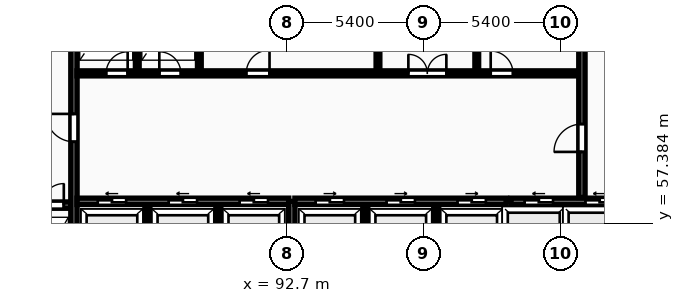
"""IFC4 building model, lengths in metres.
Left out: names, types, materials, properties, quantities, classifications, styles, units other than length and angle.
Written with IfcOpenShell. Run it as: python <this file> out.ifc"""

import sys

from ifc_helpers import new_model, si_unit, direction, frame, frame_2d, origin, place, context, subcontext, project, spatial, rectangle, extrude, element, fill, save


model = new_model("IFC4")
c1 = context("Model", 3, precision=1e-05, world=origin(), true_north=direction((0.0, 1.0)))
c2 = subcontext(c1, "Body", "Model", "MODEL_VIEW")
j1 = project(units=[si_unit("LENGTHUNIT", "METRE"), si_unit("PLANEANGLEUNIT", "RADIAN")], contexts=[c1])
p1 = place(None, origin())
s1 = spatial("IfcSite", under=j1, at=p1, CompositionType="ELEMENT")
p2 = place(p1, origin())
s2 = spatial("IfcBuilding", under=s1, at=p2, CompositionType="ELEMENT")
p3 = place(p2, frame((0.0, 0.0, 93.8)))
s3 = spatial("IfcBuildingStorey", under=s2, at=p3, CompositionType="ELEMENT", Elevation=93.8)
p4 = place(p3, frame((79.79, 58.1, 0.0), z_axis=(0.0, 0.0, 1.0), x_axis=(1.0, 0.0, 0.0)))
e1 = element("IfcWall", 1, at=p4, inside=s3, PredefinedType="SHEAR", context=c2, shape_type="SweptSolid", body=[
    extrude(rectangle(XDim=4.39, YDim=0.25, at=frame_2d((2.195, 0.0))), origin(), (0.0, 0.0, 1.0), 3.25),
])
p5 = place(p4, frame((1.05, 0.0, 0.0)))
e2 = element("IfcOpeningElement", 2, at=p5, cuts=e1, PredefinedType="OPENING", context=c2, shape_type="SweptSolid", body=[
    extrude(rectangle(XDim=1.12, YDim=2.12, at=frame_2d((0.56, 1.06))), frame((0.0, 0.135, 0.0), z_axis=(0.0, -1.0, 0.0), x_axis=(1.0, 0.0, 0.0)), (0.0, 0.0, 1.0), 0.27),
])
p6 = place(p4, frame((3.26, 0.0, 0.0)))
e3 = element("IfcOpeningElement", 3, at=p6, cuts=e1, PredefinedType="OPENING", context=c2, shape_type="SweptSolid", body=[
    extrude(rectangle(XDim=0.85, YDim=2.05, at=frame_2d((0.425, 1.025))), frame((0.0, 0.135, 0.0), z_axis=(0.0, -1.0, 0.0), x_axis=(1.0, 0.0, 0.0)), (0.0, 0.0, 1.0), 0.27),
])
p7 = place(p3, frame((84.3, 55.4, 0.0), z_axis=(0.0, 0.0, 1.0), x_axis=(0.0, 1.0, 0.0)))
e4 = element("IfcWall", 4, at=p7, inside=s3, PredefinedType="SHEAR", context=c2, shape_type="SweptSolid", body=[
    extrude(rectangle(XDim=11.6, YDim=0.25, at=frame_2d((5.8, 0.0))), origin(), (0.0, 0.0, 1.0), 3.25),
])
p8 = place(p7, frame((5.2, 0.0, 0.0)))
e5 = element("IfcOpeningElement", 5, at=p8, cuts=e4, PredefinedType="OPENING", context=c2, shape_type="SweptSolid", body=[
    extrude(rectangle(XDim=1.1, YDim=2.1, at=frame_2d((0.55, 1.05))), frame((0.0, 0.135, 0.0), z_axis=(0.0, -1.0, 0.0), x_axis=(1.0, 0.0, 0.0)), (0.0, 0.0, 1.0), 0.27),
])
for number, where, z_axis, x_axis in (
    (6, (87.2, 55.4, 0.0), (0.0, 0.0, 1.0), (0.0, 1.0, 0.0)),
    (7, (90.0, 55.4, 0.0), (0.0, 0.0, 1.0), (0.0, 1.0, 0.0)),
):
    element("IfcWall", number, at=place(p3, frame(where, z_axis=z_axis, x_axis=x_axis)), inside=s3, PredefinedType="PARTITIONING", context=c2, shape_type="SweptSolid", body=[
        extrude(rectangle(XDim=2.72, YDim=0.2, at=frame_2d((1.36, 0.0))), origin(), (0.0, 0.0, 1.0), 2.97),
    ])
p9 = place(p3, frame((84.42, 58.25, 0.0), z_axis=(0.0, 0.0, 1.0), x_axis=(1.0, 0.0, 0.0)))
e8 = element("IfcWall", 8, at=p9, inside=s3, PredefinedType="SHEAR", context=c2, shape_type="SweptSolid", body=[
    extrude(rectangle(XDim=8.36, YDim=0.25, at=frame_2d((4.18, 0.0))), origin(), (0.0, 0.0, 1.0), 3.25),
])
p10 = place(p9, frame((0.82, 0.0, 0.0)))
e9 = element("IfcOpeningElement", 9, at=p10, cuts=e8, PredefinedType="OPENING", context=c2, shape_type="SweptSolid", body=[
    extrude(rectangle(XDim=1.12, YDim=2.12, at=frame_2d((0.56, 1.06))), frame((0.0, 0.135, 0.0), z_axis=(0.0, -1.0, 0.0), x_axis=(1.0, 0.0, 0.0)), (0.0, 0.0, 1.0), 0.27),
])
p11 = place(p9, frame((3.62, 0.0, 0.0)))
e10 = element("IfcOpeningElement", 10, at=p11, cuts=e8, PredefinedType="OPENING", context=c2, shape_type="SweptSolid", body=[
    extrude(rectangle(XDim=1.12, YDim=2.12, at=frame_2d((0.56, 1.06))), frame((0.0, 0.135, 0.0), z_axis=(0.0, -1.0, 0.0), x_axis=(1.0, 0.0, 0.0)), (0.0, 0.0, 1.0), 0.27),
])
p12 = place(p9, frame((6.42, 0.0, 0.0)))
e11 = element("IfcOpeningElement", 11, at=p12, cuts=e8, PredefinedType="OPENING", context=c2, shape_type="SweptSolid", body=[
    extrude(rectangle(XDim=1.12, YDim=2.12, at=frame_2d((0.56, 1.06))), frame((0.0, 0.135, 0.0), z_axis=(0.0, -1.0, 0.0), x_axis=(1.0, 0.0, 0.0)), (0.0, 0.0, 1.0), 0.27),
])
p13 = place(p3, frame((92.9, 55.4, 0.0), z_axis=(0.0, 0.0, 1.0), x_axis=(0.0, 1.0, 0.0)))
e12 = element("IfcWall", 12, at=p13, inside=s3, PredefinedType="SHEAR", context=c2, shape_type="SweptSolid", body=[
    extrude(rectangle(XDim=2.85, YDim=0.25, at=frame_2d((1.425, 0.0))), origin(), (0.0, 0.0, 1.0), 3.25),
])
for number, where, z_axis, x_axis in (
    (13, (95.8, 55.4, 0.0), (0.0, 0.0, 1.0), (0.0, 1.0, 0.0)),
    (14, (98.6, 55.4, 0.0), (0.0, 0.0, 1.0), (0.0, 1.0, 0.0)),
):
    element("IfcWall", number, at=place(p3, frame(where, z_axis=z_axis, x_axis=x_axis)), inside=s3, PredefinedType="PARTITIONING", context=c2, shape_type="SweptSolid", body=[
        extrude(rectangle(XDim=2.72, YDim=0.2, at=frame_2d((1.36, 0.0))), origin(), (0.0, 0.0, 1.0), 2.97),
    ])
p14 = place(p3, frame((93.02, 58.25, 0.0), z_axis=(0.0, 0.0, 1.0), x_axis=(1.0, 0.0, 0.0)))
e15 = element("IfcWall", 15, at=p14, inside=s3, PredefinedType="SHEAR", context=c2, shape_type="SweptSolid", body=[
    extrude(rectangle(XDim=8.36, YDim=0.25, at=frame_2d((4.18, 0.0))), origin(), (0.0, 0.0, 1.0), 3.25),
])
p15 = place(p14, frame((0.82, 0.0, 0.0)))
e16 = element("IfcOpeningElement", 16, at=p15, cuts=e15, PredefinedType="OPENING", context=c2, shape_type="SweptSolid", body=[
    extrude(rectangle(XDim=1.12, YDim=2.12, at=frame_2d((0.56, 1.06))), frame((0.0, 0.135, 0.0), z_axis=(0.0, -1.0, 0.0), x_axis=(1.0, 0.0, 0.0)), (0.0, 0.0, 1.0), 0.27),
])
p16 = place(p14, frame((3.62, 0.0, 0.0)))
e17 = element("IfcOpeningElement", 17, at=p16, cuts=e15, PredefinedType="OPENING", context=c2, shape_type="SweptSolid", body=[
    extrude(rectangle(XDim=1.12, YDim=2.12, at=frame_2d((0.56, 1.06))), frame((0.0, 0.135, 0.0), z_axis=(0.0, -1.0, 0.0), x_axis=(1.0, 0.0, 0.0)), (0.0, 0.0, 1.0), 0.27),
])
p17 = place(p14, frame((6.42, 0.0, 0.0)))
e18 = element("IfcOpeningElement", 18, at=p17, cuts=e15, PredefinedType="OPENING", context=c2, shape_type="SweptSolid", body=[
    extrude(rectangle(XDim=1.12, YDim=2.12, at=frame_2d((0.56, 1.06))), frame((0.0, 0.135, 0.0), z_axis=(0.0, -1.0, 0.0), x_axis=(1.0, 0.0, 0.0)), (0.0, 0.0, 1.0), 0.27),
])
p18 = place(p3, frame((101.48, 55.4, 0.0), z_axis=(0.0, 0.0, 1.0), x_axis=(0.0, 1.0, 0.0)))
e19 = element("IfcWall", 19, at=p18, inside=s3, PredefinedType="SHEAR", context=c2, shape_type="SweptSolid", body=[
    extrude(rectangle(XDim=2.85, YDim=0.25, at=frame_2d((1.425, 0.0))), origin(), (0.0, 0.0, 1.0), 3.25),
])
p19 = place(p3, frame((103.85, 55.4, 0.0), z_axis=(0.0, 0.0, 1.0), x_axis=(0.0, 1.0, 0.0)))
e20 = element("IfcWall", 20, at=p19, inside=s3, PredefinedType="PARTITIONING", context=c2, shape_type="SweptSolid", body=[
    extrude(rectangle(XDim=2.72, YDim=0.2, at=frame_2d((1.36, 0.0))), origin(), (0.0, 0.0, 1.0), 2.97),
])
p20 = place(p3, frame((101.55, 58.25, 0.0), z_axis=(0.0, 0.0, 1.0), x_axis=(1.0, 0.0, 0.0)))
e21 = element("IfcWall", 21, at=p20, inside=s3, PredefinedType="SHEAR", context=c2, shape_type="SweptSolid", body=[
    extrude(rectangle(XDim=4.6, YDim=0.25, at=frame_2d((2.3, 0.0))), origin(), (0.0, 0.0, 1.0), 3.25),
])
p21 = place(p20, frame((0.54, 0.0, 0.0)))
e22 = element("IfcOpeningElement", 22, at=p21, cuts=e21, PredefinedType="OPENING", context=c2, shape_type="SweptSolid", body=[
    extrude(rectangle(XDim=1.12, YDim=2.12, at=frame_2d((0.56, 1.06))), frame((0.0, 0.135, 0.0), z_axis=(0.0, -1.0, 0.0), x_axis=(1.0, 0.0, 0.0)), (0.0, 0.0, 1.0), 0.27),
])
p22 = place(p20, frame((2.94, 0.0, 0.0)))
e23 = element("IfcOpeningElement", 23, at=p22, cuts=e21, PredefinedType="OPENING", context=c2, shape_type="SweptSolid", body=[
    extrude(rectangle(XDim=1.12, YDim=2.12, at=frame_2d((0.56, 1.06))), frame((0.0, 0.135, 0.0), z_axis=(0.0, -1.0, 0.0), x_axis=(1.0, 0.0, 0.0)), (0.0, 0.0, 1.0), 0.27),
])
for number, where, z_axis, x_axis in (
    (24, (86.8, 63.4, 0.0), (0.0, 0.0, 1.0), (0.0, 1.0, 0.0)),
    (25, (89.25, 63.4, 0.0), (0.0, 0.0, 1.0), (0.0, 1.0, 0.0)),
    (26, (96.3, 63.4, 0.0), (0.0, 0.0, 1.0), (0.0, 1.0, 0.0)),
    (27, (100.2, 63.4, 0.0), (0.0, 0.0, 1.0), (0.0, 1.0, 0.0)),
):
    element("IfcWall", number, at=place(p3, frame(where, z_axis=z_axis, x_axis=x_axis)), inside=s3, PredefinedType="PARTITIONING", context=c2, shape_type="SweptSolid", body=[
        extrude(rectangle(XDim=3.6, YDim=0.15, at=frame_2d((1.8, 0.0))), origin(), (0.0, 0.0, 1.0), 2.97),
    ])
p23 = place(p3, frame((84.42, 63.3, 0.0), z_axis=(0.0, 0.0, 1.0), x_axis=(1.0, 0.0, 0.0)))
e28 = element("IfcWall", 28, at=p23, inside=s3, PredefinedType="PARTITIONING", context=c2, shape_type="SweptSolid", body=[
    extrude(rectangle(XDim=19.83, YDim=0.2, at=frame_2d((9.915, 0.0))), origin(), (0.0, 0.0, 1.0), 2.97),
])
p24 = place(p23, frame((1.15, 0.0, 0.0)))
e29 = element("IfcOpeningElement", 29, at=p24, cuts=e28, PredefinedType="OPENING", context=c2, shape_type="SweptSolid", body=[
    extrude(rectangle(XDim=0.85, YDim=2.05, at=frame_2d((0.425, 1.025))), frame((0.0, 0.11, 0.0), z_axis=(0.0, -1.0, 0.0), x_axis=(1.0, 0.0, 0.0)), (0.0, 0.0, 1.0), 0.22),
])
p25 = place(p23, frame((3.25, 0.0, 0.0)))
e30 = element("IfcOpeningElement", 30, at=p25, cuts=e28, PredefinedType="OPENING", context=c2, shape_type="SweptSolid", body=[
    extrude(rectangle(XDim=0.85, YDim=2.05, at=frame_2d((0.425, 1.025))), frame((0.0, 0.11, 0.0), z_axis=(0.0, -1.0, 0.0), x_axis=(1.0, 0.0, 0.0)), (0.0, 0.0, 1.0), 0.22),
])
p26 = place(p23, frame((13.08, 0.0, 0.0)))
e31 = element("IfcOpeningElement", 31, at=p26, cuts=e28, PredefinedType="OPENING", context=c2, shape_type="SweptSolid", body=[
    extrude(rectangle(XDim=1.5, YDim=2.2, at=frame_2d((0.75, 1.1))), frame((0.0, 0.11, 0.0), z_axis=(0.0, -1.0, 0.0), x_axis=(1.0, 0.0, 0.0)), (0.0, 0.0, 1.0), 0.22),
])
p27 = place(p23, frame((6.68, 0.0, 0.0)))
e32 = element("IfcOpeningElement", 32, at=p27, cuts=e28, PredefinedType="OPENING", context=c2, shape_type="SweptSolid", body=[
    extrude(rectangle(XDim=0.92, YDim=2.08, at=frame_2d((0.46, 1.04))), frame((0.0, 0.11, 0.0), z_axis=(0.0, -1.0, 0.0), x_axis=(1.0, 0.0, 0.0)), (0.0, 0.0, 1.0), 0.22),
])
p28 = place(p23, frame((16.33, 0.0, 0.0)))
e33 = element("IfcOpeningElement", 33, at=p28, cuts=e28, PredefinedType="OPENING", context=c2, shape_type="SweptSolid", body=[
    extrude(rectangle(XDim=0.88, YDim=2.06, at=frame_2d((0.44, 1.03))), frame((0.0, 0.11, 0.0), z_axis=(0.0, -1.0, 0.0), x_axis=(1.0, 0.0, 0.0)), (0.0, 0.0, 1.0), 0.22),
])
p29 = place(p3, frame((104.35, 58.4, 0.0), z_axis=(0.0, 0.0, 1.0), x_axis=(0.0, 1.0, 0.0)))
e34 = element("IfcWall", 34, at=p29, inside=s3, PredefinedType="SHEAR", context=c2, shape_type="SweptSolid", body=[
    extrude(rectangle(XDim=8.6, YDim=0.25, at=frame_2d((4.3, 0.0))), origin(), (0.0, 0.0, 1.0), 3.25),
])
p30 = place(p29, frame((1.8, 0.0, 0.0)))
e35 = element("IfcOpeningElement", 35, at=p30, cuts=e34, PredefinedType="OPENING", context=c2, shape_type="SweptSolid", body=[
    extrude(rectangle(XDim=1.1, YDim=2.1, at=frame_2d((0.55, 1.05))), frame((0.0, 0.135, 0.0), z_axis=(0.0, -1.0, 0.0), x_axis=(1.0, 0.0, 0.0)), (0.0, 0.0, 1.0), 0.27),
])
p31 = place(p6, origin())
e36 = element("IfcDoor", 36, at=p31, inside=s3, OperationType="SINGLE_SWING_RIGHT", PredefinedType="DOOR", context=c2, shape_type="SweptSolid", body=[
    extrude(rectangle(XDim=0.85, YDim=2.05, at=frame_2d((0.425, 1.025))), frame((0.0, 0.025, 0.0), z_axis=(0.0, -1.0, 0.0), x_axis=(1.0, 0.0, 0.0)), (0.0, 0.0, 1.0), 0.05),
])
fill(e3, e36)
p32 = place(p8, origin())
e37 = element("IfcDoor", 37, at=p32, inside=s3, OperationType="SINGLE_SWING_RIGHT", PredefinedType="DOOR", context=c2, shape_type="SweptSolid", body=[
    extrude(rectangle(XDim=1.1, YDim=2.1, at=frame_2d((0.55, 1.05))), frame((0.0, 0.025, 0.0), z_axis=(0.0, -1.0, 0.0), x_axis=(1.0, 0.0, 0.0)), (0.0, 0.0, 1.0), 0.05),
])
fill(e5, e37)
p33 = place(p10, origin())
e38 = element("IfcDoor", 38, at=p33, inside=s3, OperationType="SLIDING_TO_LEFT", PredefinedType="DOOR", context=c2, shape_type="SweptSolid", body=[
    extrude(rectangle(XDim=1.12, YDim=2.12, at=frame_2d((0.56, 1.06))), frame((0.0, 0.025, 0.0), z_axis=(0.0, -1.0, 0.0), x_axis=(1.0, 0.0, 0.0)), (0.0, 0.0, 1.0), 0.05),
])
fill(e9, e38)
p34 = place(p11, origin())
e39 = element("IfcDoor", 39, at=p34, inside=s3, OperationType="SLIDING_TO_LEFT", PredefinedType="DOOR", context=c2, shape_type="SweptSolid", body=[
    extrude(rectangle(XDim=1.12, YDim=2.12, at=frame_2d((0.56, 1.06))), frame((0.0, 0.025, 0.0), z_axis=(0.0, -1.0, 0.0), x_axis=(1.0, 0.0, 0.0)), (0.0, 0.0, 1.0), 0.05),
])
fill(e10, e39)
p35 = place(p12, origin())
e40 = element("IfcDoor", 40, at=p35, inside=s3, OperationType="SLIDING_TO_LEFT", PredefinedType="DOOR", context=c2, shape_type="SweptSolid", body=[
    extrude(rectangle(XDim=1.12, YDim=2.12, at=frame_2d((0.56, 1.06))), frame((0.0, 0.025, 0.0), z_axis=(0.0, -1.0, 0.0), x_axis=(1.0, 0.0, 0.0)), (0.0, 0.0, 1.0), 0.05),
])
fill(e11, e40)
p36 = place(p15, origin())
e41 = element("IfcDoor", 41, at=p36, inside=s3, OperationType="SLIDING_TO_RIGHT", PredefinedType="DOOR", context=c2, shape_type="SweptSolid", body=[
    extrude(rectangle(XDim=1.12, YDim=2.12, at=frame_2d((0.56, 1.06))), frame((0.0, 0.025, 0.0), z_axis=(0.0, -1.0, 0.0), x_axis=(1.0, 0.0, 0.0)), (0.0, 0.0, 1.0), 0.05),
])
fill(e16, e41)
p37 = place(p16, origin())
e42 = element("IfcDoor", 42, at=p37, inside=s3, OperationType="SLIDING_TO_RIGHT", PredefinedType="DOOR", context=c2, shape_type="SweptSolid", body=[
    extrude(rectangle(XDim=1.12, YDim=2.12, at=frame_2d((0.56, 1.06))), frame((0.0, 0.025, 0.0), z_axis=(0.0, -1.0, 0.0), x_axis=(1.0, 0.0, 0.0)), (0.0, 0.0, 1.0), 0.05),
])
fill(e17, e42)
p38 = place(p17, origin())
e43 = element("IfcDoor", 43, at=p38, inside=s3, OperationType="SLIDING_TO_RIGHT", PredefinedType="DOOR", context=c2, shape_type="SweptSolid", body=[
    extrude(rectangle(XDim=1.12, YDim=2.12, at=frame_2d((0.56, 1.06))), frame((0.0, 0.025, 0.0), z_axis=(0.0, -1.0, 0.0), x_axis=(1.0, 0.0, 0.0)), (0.0, 0.0, 1.0), 0.05),
])
fill(e18, e43)
p39 = place(p21, origin())
e44 = element("IfcDoor", 44, at=p39, inside=s3, OperationType="SLIDING_TO_LEFT", PredefinedType="DOOR", context=c2, shape_type="SweptSolid", body=[
    extrude(rectangle(XDim=1.12, YDim=2.12, at=frame_2d((0.56, 1.06))), frame((0.0, 0.025, 0.0), z_axis=(0.0, -1.0, 0.0), x_axis=(1.0, 0.0, 0.0)), (0.0, 0.0, 1.0), 0.05),
])
fill(e22, e44)
p40 = place(p22, origin())
e45 = element("IfcDoor", 45, at=p40, inside=s3, OperationType="SLIDING_TO_LEFT", PredefinedType="DOOR", context=c2, shape_type="SweptSolid", body=[
    extrude(rectangle(XDim=1.12, YDim=2.12, at=frame_2d((0.56, 1.06))), frame((0.0, 0.025, 0.0), z_axis=(0.0, -1.0, 0.0), x_axis=(1.0, 0.0, 0.0)), (0.0, 0.0, 1.0), 0.05),
])
fill(e23, e45)
p41 = place(p24, origin())
e46 = element("IfcDoor", 46, at=p41, inside=s3, OperationType="SINGLE_SWING_RIGHT", PredefinedType="DOOR", context=c2, shape_type="SweptSolid", body=[
    extrude(rectangle(XDim=0.85, YDim=2.05, at=frame_2d((0.425, 1.025))), frame((0.0, 0.025, 0.0), z_axis=(0.0, -1.0, 0.0), x_axis=(1.0, 0.0, 0.0)), (0.0, 0.0, 1.0), 0.05),
])
fill(e29, e46)
p42 = place(p25, origin())
e47 = element("IfcDoor", 47, at=p42, inside=s3, OperationType="SINGLE_SWING_LEFT", PredefinedType="DOOR", context=c2, shape_type="SweptSolid", body=[
    extrude(rectangle(XDim=0.85, YDim=2.05, at=frame_2d((0.425, 1.025))), frame((0.0, 0.025, 0.0), z_axis=(0.0, -1.0, 0.0), x_axis=(1.0, 0.0, 0.0)), (0.0, 0.0, 1.0), 0.05),
])
fill(e30, e47)
p43 = place(p26, origin())
e48 = element("IfcDoor", 48, at=p43, inside=s3, OperationType="DOUBLE_DOOR_SINGLE_SWING", PredefinedType="DOOR", context=c2, shape_type="SweptSolid", body=[
    extrude(rectangle(XDim=1.5, YDim=2.2, at=frame_2d((0.75, 1.1))), frame((0.0, 0.025, 0.0), z_axis=(0.0, -1.0, 0.0), x_axis=(1.0, 0.0, 0.0)), (0.0, 0.0, 1.0), 0.05),
])
fill(e31, e48)
p44 = place(p27, origin())
e49 = element("IfcDoor", 49, at=p44, inside=s3, OperationType="SINGLE_SWING_RIGHT", PredefinedType="DOOR", context=c2, shape_type="SweptSolid", body=[
    extrude(rectangle(XDim=0.92, YDim=2.08, at=frame_2d((0.46, 1.04))), frame((0.0, 0.025, 0.0), z_axis=(0.0, -1.0, 0.0), x_axis=(1.0, 0.0, 0.0)), (0.0, 0.0, 1.0), 0.05),
])
fill(e32, e49)
p45 = place(p28, origin())
e50 = element("IfcDoor", 50, at=p45, inside=s3, OperationType="SINGLE_SWING_LEFT", PredefinedType="DOOR", context=c2, shape_type="SweptSolid", body=[
    extrude(rectangle(XDim=0.88, YDim=2.06, at=frame_2d((0.44, 1.03))), frame((0.0, 0.025, 0.0), z_axis=(0.0, -1.0, 0.0), x_axis=(1.0, 0.0, 0.0)), (0.0, 0.0, 1.0), 0.05),
])
fill(e33, e50)
p46 = place(p30, origin())
e51 = element("IfcDoor", 51, at=p46, inside=s3, OperationType="SINGLE_SWING_LEFT", PredefinedType="DOOR", context=c2, shape_type="SweptSolid", body=[
    extrude(rectangle(XDim=1.1, YDim=2.1, at=frame_2d((0.55, 1.05))), frame((0.0, 0.025, 0.0), z_axis=(0.0, -1.0, 0.0), x_axis=(1.0, 0.0, 0.0)), (0.0, 0.0, 1.0), 0.05),
])
fill(e35, e51)
save(model, sys.argv[1])
